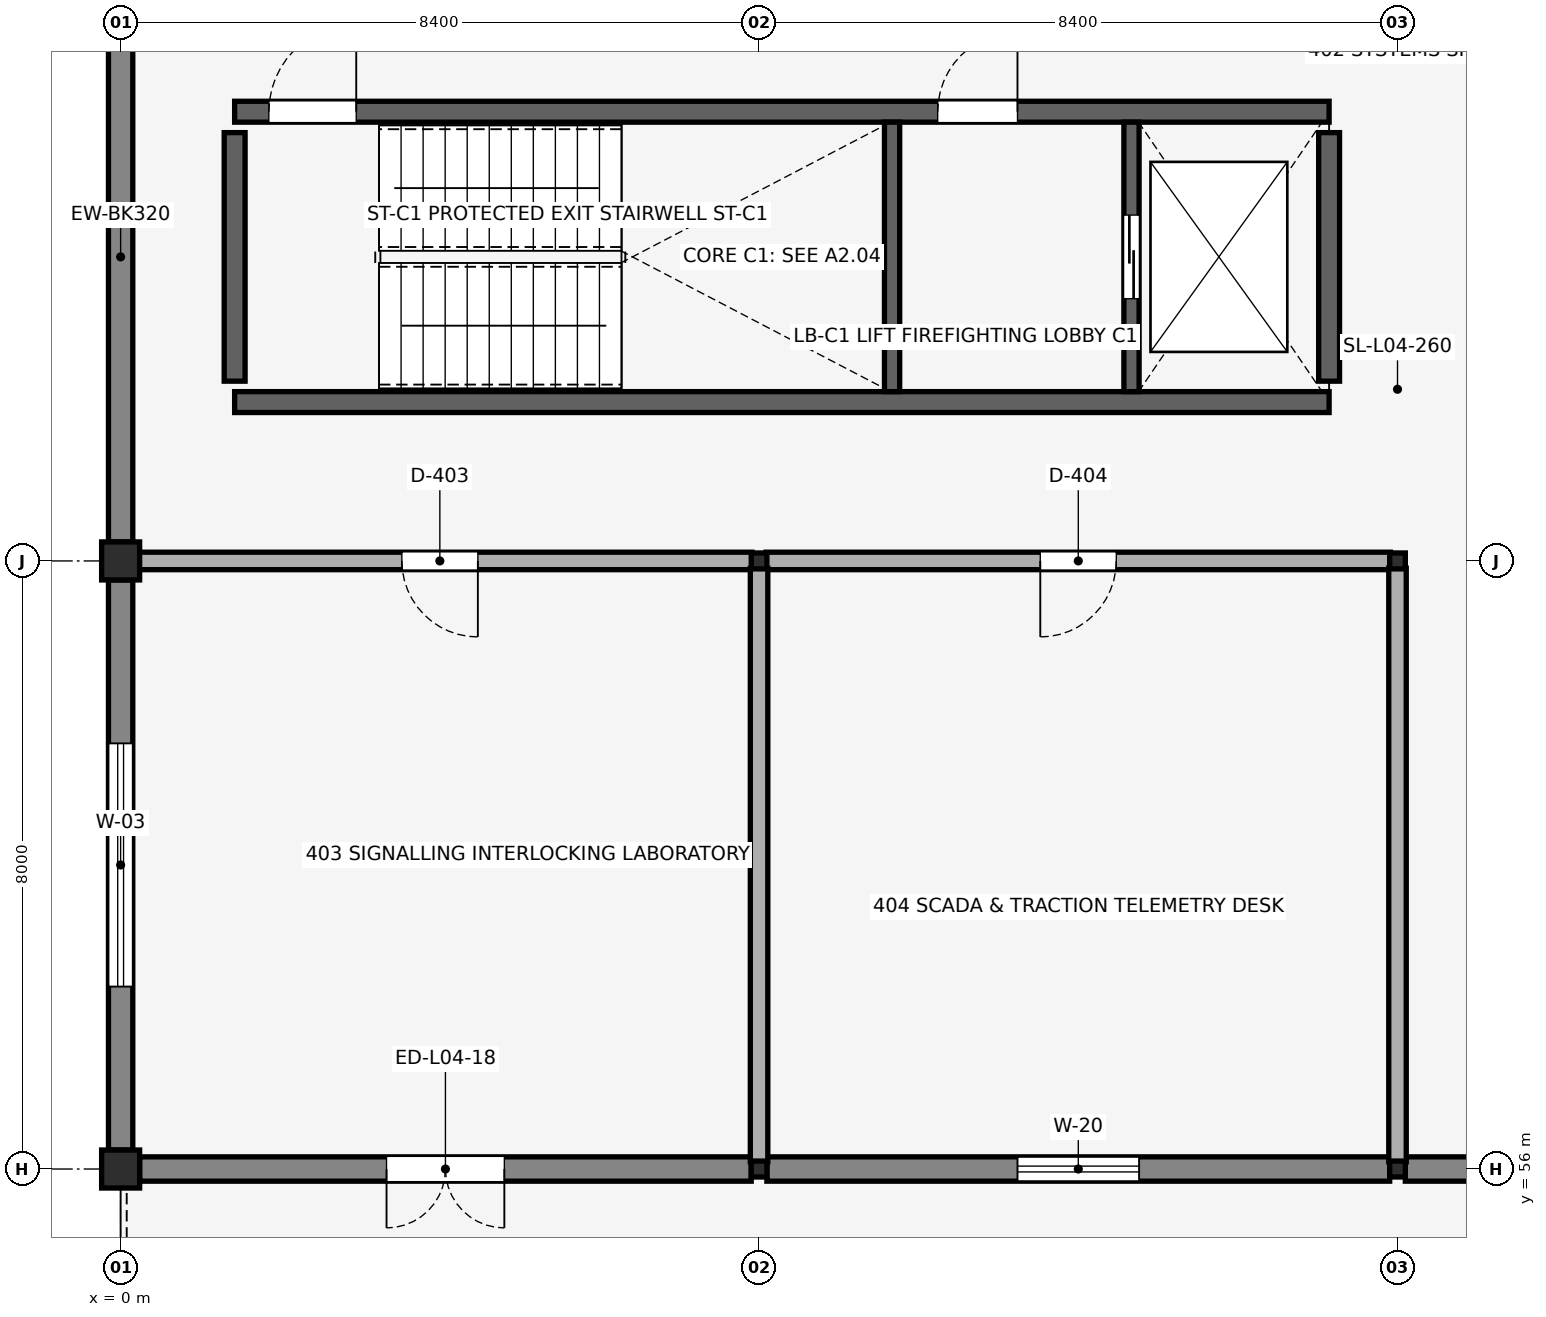
"""IFC4 building model, lengths in metres.
Left out: names, types, materials, properties, quantities, classifications, styles, units other than length and angle.
Written with IfcOpenShell. Run it as: python <this file> out.ifc"""

import sys

from ifc_helpers import new_model, si_unit, direction, frame, frame_2d, origin, origin_2d, place, context, subcontext, project, spatial, rectangle, i_section, extrude, element, fill, save


model = new_model("IFC4")
c1 = context("Model", 3, precision=1e-05, world=origin(), true_north=direction((0.0, 1.0)))
c2 = subcontext(c1, "Body", "Model", "MODEL_VIEW")
j1 = project(units=[si_unit("LENGTHUNIT", "METRE"), si_unit("PLANEANGLEUNIT", "RADIAN")], contexts=[c1])
p1 = place(None, origin())
s1 = spatial("IfcSite", under=j1, at=p1, CompositionType="ELEMENT")
p2 = place(p1, origin())
s2 = spatial("IfcBuilding", under=s1, at=p2, CompositionType="ELEMENT")
p3 = place(p2, frame((0.0, 0.0, 17.2)))
s3 = spatial("IfcBuildingStorey", under=s2, at=p3, CompositionType="ELEMENT", Elevation=17.2)
p4 = place(p3, frame((1.5, 66.09, 0.0), z_axis=(0.0, 0.0, 1.0), x_axis=(1.0, 0.0, 0.0)))
e1 = element("IfcWall", 1, at=p4, inside=s3, PredefinedType="SHEAR", context=c2, shape_type="SweptSolid", body=[
    extrude(rectangle(XDim=14.4, YDim=0.275, at=frame_2d((7.2, 0.0))), origin(), (0.0, 0.0, 1.0), 3.59),
])
p5 = place(p3, frame((1.5, 69.91, 0.0), z_axis=(0.0, 0.0, 1.0), x_axis=(1.0, 0.0, 0.0)))
e2 = element("IfcWall", 2, at=p5, inside=s3, PredefinedType="SHEAR", context=c2, shape_type="SweptSolid", body=[
    extrude(rectangle(XDim=14.4, YDim=0.275, at=frame_2d((7.2, 0.0))), origin(), (0.0, 0.0, 1.0), 3.59),
])
p6 = place(p5, frame((0.45, 0.0, 0.0), z_axis=(0.0, 0.0, 1.0), x_axis=(1.0, 0.0, 0.0)))
e3 = element("IfcOpeningElement", 3, at=p6, cuts=e2, PredefinedType="OPENING", context=c2, shape_type="SweptSolid", body=[
    extrude(rectangle(XDim=1.15, YDim=2.15, at=frame_2d((0.575, 1.075))), frame((0.0, 0.147, 0.0), z_axis=(0.0, -1.0, 0.0), x_axis=(1.0, 0.0, 0.0)), (0.0, 0.0, 1.0), 0.295),
])
p7 = place(p5, frame((9.25, 0.0, 0.0), z_axis=(0.0, 0.0, 1.0), x_axis=(1.0, 0.0, 0.0)))
e4 = element("IfcOpeningElement", 4, at=p7, cuts=e2, PredefinedType="OPENING", context=c2, shape_type="SweptSolid", body=[
    extrude(rectangle(XDim=1.05, YDim=2.15, at=frame_2d((0.525, 1.075))), frame((0.0, 0.147, 0.0), z_axis=(0.0, -1.0, 0.0), x_axis=(1.0, 0.0, 0.0)), (0.0, 0.0, 1.0), 0.295),
])
for number, where, z_axis, x_axis in (
    (5, (1.5, 66.365, 0.0), (0.0, 0.0, 1.0), (0.0, 1.0, 0.0)),
    (6, (15.9, 66.365, 0.0), (0.0, 0.0, 1.0), (0.0, 1.0, 0.0)),
):
    element("IfcWall", number, at=place(p3, frame(where, z_axis=z_axis, x_axis=x_axis)), inside=s3, PredefinedType="SHEAR", context=c2, shape_type="SweptSolid", body=[
        extrude(rectangle(XDim=3.27, YDim=0.275, at=frame_2d((1.635, 0.0))), origin(), (0.0, 0.0, 1.0), 3.59),
    ])
for number, where, z_axis, x_axis in (
    (7, (0.0, 56.0, 0.0), (0.0, 0.0, 1.0), (1.0, 0.0, 0.0)),
    (8, (0.0, 64.0, 0.0), (0.0, 0.0, 1.0), (1.0, 0.0, 0.0)),
):
    element("IfcColumn", number, at=place(p3, frame(where, z_axis=z_axis, x_axis=x_axis)), inside=s3, PredefinedType="COLUMN", context=c2, shape_type="SweptSolid", body=[
        extrude(rectangle(XDim=0.5, YDim=0.5, at=origin_2d()), origin(), (0.0, 0.0, 1.0), 3.59),
    ])
for number, where, z_axis, x_axis in (
    (9, (8.4, 56.0, 0.0), (0.0, 0.0, 1.0), (1.0, 0.0, 0.0)),
    (10, (8.4, 64.0, 0.0), (0.0, 0.0, 1.0), (1.0, 0.0, 0.0)),
    (11, (16.8, 56.0, 0.0), (0.0, 0.0, 1.0), (1.0, 0.0, 0.0)),
    (12, (16.8, 64.0, 0.0), (0.0, 0.0, 1.0), (1.0, 0.0, 0.0)),
):
    element("IfcColumn", number, at=place(p3, frame(where, z_axis=z_axis, x_axis=x_axis)), inside=s3, PredefinedType="COLUMN", context=c2, shape_type="SweptSolid", body=[
        extrude(i_section(OverallWidth=0.206, OverallDepth=0.21, WebThickness=0.01, FlangeThickness=0.014, FilletRadius=0.01, at=origin_2d()), origin(), (0.0, 0.0, 1.0), 3.59),
    ])
p8 = place(p3, frame((0.25, 56.0, 0.0), z_axis=(0.0, 0.0, 1.0), x_axis=(1.0, 0.0, 0.0)))
e13 = element("IfcWall", 13, at=p8, inside=s3, PredefinedType="SOLIDWALL", context=c2, shape_type="SweptSolid", body=[
    extrude(rectangle(XDim=8.047, YDim=0.32, at=frame_2d((4.023, 0.0))), origin(), (0.0, 0.0, 1.0), 3.33),
])
p9 = place(p8, frame((4.799, 0.0, 0.0), z_axis=(0.0, 0.0, 1.0), x_axis=(-1.0, 0.0, 0.0)))
e14 = element("IfcOpeningElement", 14, at=p9, cuts=e13, PredefinedType="OPENING", context=c2, shape_type="SweptSolid", body=[
    extrude(rectangle(XDim=1.55, YDim=2.2, at=frame_2d((0.775, 1.1))), frame((0.0, 0.17, 0.0), z_axis=(0.0, -1.0, 0.0), x_axis=(1.0, 0.0, 0.0)), (0.0, 0.0, 1.0), 0.34),
])
p10 = place(p3, frame((8.503, 56.0, 0.0), z_axis=(0.0, 0.0, 1.0), x_axis=(1.0, 0.0, 0.0)))
e15 = element("IfcWall", 15, at=p10, inside=s3, PredefinedType="SOLIDWALL", context=c2, shape_type="SweptSolid", body=[
    extrude(rectangle(XDim=8.194, YDim=0.32, at=frame_2d((4.097, 0.0))), origin(), (0.0, 0.0, 1.0), 3.33),
])
p11 = place(p10, frame((3.297, 0.0, 0.9), z_axis=(0.0, 0.0, 1.0), x_axis=(1.0, 0.0, 0.0)))
e16 = element("IfcOpeningElement", 16, at=p11, cuts=e15, PredefinedType="OPENING", context=c2, shape_type="SweptSolid", body=[
    extrude(rectangle(XDim=1.6, YDim=1.2, at=frame_2d((0.8, 0.6))), frame((0.0, 0.17, 0.0), z_axis=(0.0, -1.0, 0.0), x_axis=(1.0, 0.0, 0.0)), (0.0, 0.0, 1.0), 0.34),
])
p12 = place(p3, frame((16.903, 56.0, 0.0), z_axis=(0.0, 0.0, 1.0), x_axis=(1.0, 0.0, 0.0)))
e17 = element("IfcWall", 17, at=p12, inside=s3, PredefinedType="SOLIDWALL", context=c2, shape_type="SweptSolid", body=[
    extrude(rectangle(XDim=8.194, YDim=0.32, at=frame_2d((4.097, 0.0))), origin(), (0.0, 0.0, 1.0), 3.33),
])
p13 = place(p12, frame((2.297, 0.0, 0.9), z_axis=(0.0, 0.0, 1.0), x_axis=(1.0, 0.0, 0.0)))
e18 = element("IfcOpeningElement", 18, at=p13, cuts=e17, PredefinedType="OPENING", context=c2, shape_type="SweptSolid", body=[
    extrude(rectangle(XDim=3.6, YDim=1.8, at=frame_2d((1.8, 0.9))), frame((0.0, 0.17, 0.0), z_axis=(0.0, -1.0, 0.0), x_axis=(1.0, 0.0, 0.0)), (0.0, 0.0, 1.0), 0.34),
])
p14 = place(p3, frame((0.0, 56.25, 0.0), z_axis=(0.0, 0.0, 1.0), x_axis=(0.0, 1.0, 0.0)))
e19 = element("IfcWall", 19, at=p14, inside=s3, PredefinedType="SOLIDWALL", context=c2, shape_type="SweptSolid", body=[
    extrude(rectangle(XDim=7.5, YDim=0.32, at=frame_2d((3.75, 0.0))), origin(), (0.0, 0.0, 1.0), 3.29),
])
p15 = place(p14, frame((2.15, 0.0, 0.9), z_axis=(0.0, 0.0, 1.0), x_axis=(1.0, 0.0, 0.0)))
e20 = element("IfcOpeningElement", 20, at=p15, cuts=e19, PredefinedType="OPENING", context=c2, shape_type="SweptSolid", body=[
    extrude(rectangle(XDim=3.2, YDim=1.65, at=frame_2d((1.6, 0.825))), frame((0.0, 0.17, 0.0), z_axis=(0.0, -1.0, 0.0), x_axis=(1.0, 0.0, 0.0)), (0.0, 0.0, 1.0), 0.34),
])
p16 = place(p3, frame((0.0, 64.25, 0.0), z_axis=(0.0, 0.0, 1.0), x_axis=(0.0, 1.0, 0.0)))
e21 = element("IfcWall", 21, at=p16, inside=s3, PredefinedType="SOLIDWALL", context=c2, shape_type="SweptSolid", body=[
    extrude(rectangle(XDim=7.5, YDim=0.32, at=frame_2d((3.75, 0.0))), origin(), (0.0, 0.0, 1.0), 3.29),
])
p17 = place(p3, frame((10.15, 66.228, 0.0), z_axis=(0.0, 0.0, 1.0), x_axis=(0.0, 1.0, 0.0)))
e22 = element("IfcWall", 22, at=p17, inside=s3, PredefinedType="SHEAR", context=c2, shape_type="SweptSolid", body=[
    extrude(rectangle(XDim=3.545, YDim=0.2, at=frame_2d((1.772, 0.0))), origin(), (0.0, 0.0, 1.0), 3.59),
])
p18 = place(p3, frame((13.3, 66.228, 0.0), z_axis=(0.0, 0.0, 1.0), x_axis=(0.0, 1.0, 0.0)))
e23 = element("IfcWall", 23, at=p18, inside=s3, PredefinedType="SHEAR", context=c2, shape_type="SweptSolid", body=[
    extrude(rectangle(XDim=3.545, YDim=0.2, at=frame_2d((1.772, 0.0))), origin(), (0.0, 0.0, 1.0), 3.59),
])
p19 = place(p18, frame((1.222, 0.0, 0.0), z_axis=(0.0, 0.0, 1.0), x_axis=(1.0, 0.0, 0.0)))
e24 = element("IfcOpeningElement", 24, at=p19, cuts=e23, PredefinedType="OPENING", context=c2, shape_type="SweptSolid", body=[
    extrude(rectangle(XDim=1.1, YDim=2.15, at=frame_2d((0.55, 1.075))), frame((0.0, 0.11, 0.0), z_axis=(0.0, -1.0, 0.0), x_axis=(1.0, 0.0, 0.0)), (0.0, 0.0, 1.0), 0.22),
])
p20 = place(p3, frame((0.24, 64.0, 0.0), z_axis=(0.0, 0.0, 1.0), x_axis=(1.0, 0.0, 0.0)))
e25 = element("IfcWall", 25, at=p20, inside=s3, PredefinedType="PARTITIONING", context=c2, shape_type="SweptSolid", body=[
    extrude(rectangle(XDim=8.067, YDim=0.23, at=frame_2d((4.034, 0.0))), origin(), (0.0, 0.0, 1.0), 3.137),
])
p21 = place(p20, frame((4.46, 0.0, 0.0), z_axis=(0.0, 0.0, 1.0), x_axis=(-1.0, 0.0, 0.0)))
e26 = element("IfcOpeningElement", 26, at=p21, cuts=e25, PredefinedType="OPENING", context=c2, shape_type="SweptSolid", body=[
    extrude(rectangle(XDim=1.0, YDim=2.15, at=frame_2d((0.5, 1.075))), frame((0.0, 0.125, 0.0), z_axis=(0.0, -1.0, 0.0), x_axis=(1.0, 0.0, 0.0)), (0.0, 0.0, 1.0), 0.25),
])
p22 = place(p3, frame((8.493, 64.0, 0.0), z_axis=(0.0, 0.0, 1.0), x_axis=(1.0, 0.0, 0.0)))
e27 = element("IfcWall", 27, at=p22, inside=s3, PredefinedType="PARTITIONING", context=c2, shape_type="SweptSolid", body=[
    extrude(rectangle(XDim=8.214, YDim=0.23, at=frame_2d((4.107, 0.0))), origin(), (0.0, 0.0, 1.0), 3.137),
])
p23 = place(p22, frame((4.607, 0.0, 0.0), z_axis=(0.0, 0.0, 1.0), x_axis=(-1.0, 0.0, 0.0)))
e28 = element("IfcOpeningElement", 28, at=p23, cuts=e27, PredefinedType="OPENING", context=c2, shape_type="SweptSolid", body=[
    extrude(rectangle(XDim=1.0, YDim=2.15, at=frame_2d((0.5, 1.075))), frame((0.0, 0.125, 0.0), z_axis=(0.0, -1.0, 0.0), x_axis=(1.0, 0.0, 0.0)), (0.0, 0.0, 1.0), 0.25),
])
for number, where, z_axis, x_axis in (
    (29, (8.4, 56.095, 0.0), (0.0, 0.0, 1.0), (0.0, 1.0, 0.0)),
    (30, (16.8, 56.095, 0.0), (0.0, 0.0, 1.0), (0.0, 1.0, 0.0)),
):
    element("IfcWall", number, at=place(p3, frame(where, z_axis=z_axis, x_axis=x_axis)), inside=s3, PredefinedType="PARTITIONING", context=c2, shape_type="SweptSolid", body=[
        extrude(rectangle(XDim=7.811, YDim=0.23, at=frame_2d((3.905, 0.0))), origin(), (0.0, 0.0, 1.0), 3.137),
    ])
p24 = place(p9, origin())
e31 = element("IfcDoor", 31, at=p24, inside=s3, OperationType="DOUBLE_DOOR_SINGLE_SWING", PredefinedType="DOOR", context=c2, shape_type="SweptSolid", body=[
    extrude(rectangle(XDim=1.55, YDim=2.2, at=frame_2d((0.775, 1.1))), frame((0.0, 0.025, 0.0), z_axis=(0.0, -1.0, 0.0), x_axis=(1.0, 0.0, 0.0)), (0.0, 0.0, 1.0), 0.05),
])
fill(e14, e31)
p25 = place(p11, origin())
e32 = element("IfcWindow", 32, at=p25, inside=s3, PartitioningType="DOUBLE_PANEL_VERTICAL", PredefinedType="WINDOW", context=c2, shape_type="SweptSolid", body=[
    extrude(rectangle(XDim=1.6, YDim=1.2, at=frame_2d((0.8, 0.6))), frame((0.0, 0.03, 0.0), z_axis=(0.0, -1.0, 0.0), x_axis=(1.0, 0.0, 0.0)), (0.0, 0.0, 1.0), 0.06),
])
fill(e16, e32)
p26 = place(p15, origin())
e33 = element("IfcWindow", 33, at=p26, inside=s3, PartitioningType="TRIPLE_PANEL_VERTICAL", PredefinedType="WINDOW", context=c2, shape_type="SweptSolid", body=[
    extrude(rectangle(XDim=3.2, YDim=1.65, at=frame_2d((1.6, 0.825))), frame((0.0, 0.03, 0.0), z_axis=(0.0, -1.0, 0.0), x_axis=(1.0, 0.0, 0.0)), (0.0, 0.0, 1.0), 0.06),
])
fill(e20, e33)
p27 = place(p6, origin())
e34 = element("IfcDoor", 34, at=p27, inside=s3, OperationType="SINGLE_SWING_RIGHT", PredefinedType="DOOR", context=c2, shape_type="SweptSolid", body=[
    extrude(rectangle(XDim=1.15, YDim=2.15, at=frame_2d((0.575, 1.075))), frame((0.0, 0.025, 0.0), z_axis=(0.0, -1.0, 0.0), x_axis=(1.0, 0.0, 0.0)), (0.0, 0.0, 1.0), 0.05),
])
fill(e3, e34)
p28 = place(p7, origin())
e35 = element("IfcDoor", 35, at=p28, inside=s3, OperationType="SINGLE_SWING_RIGHT", PredefinedType="DOOR", context=c2, shape_type="SweptSolid", body=[
    extrude(rectangle(XDim=1.05, YDim=2.15, at=frame_2d((0.525, 1.075))), frame((0.0, 0.025, 0.0), z_axis=(0.0, -1.0, 0.0), x_axis=(1.0, 0.0, 0.0)), (0.0, 0.0, 1.0), 0.05),
])
fill(e4, e35)
p29 = place(p19, origin())
e36 = element("IfcDoor", 36, at=p29, inside=s3, OperationType="DOUBLE_DOOR_SLIDING", PredefinedType="DOOR", context=c2, shape_type="SweptSolid", body=[
    extrude(rectangle(XDim=1.1, YDim=2.15, at=frame_2d((0.55, 1.075))), frame((0.0, 0.025, 0.0), z_axis=(0.0, -1.0, 0.0), x_axis=(1.0, 0.0, 0.0)), (0.0, 0.0, 1.0), 0.05),
])
fill(e24, e36)
p30 = place(p21, origin())
e37 = element("IfcDoor", 37, at=p30, inside=s3, OperationType="SINGLE_SWING_LEFT", PredefinedType="DOOR", context=c2, shape_type="SweptSolid", body=[
    extrude(rectangle(XDim=1.0, YDim=2.15, at=frame_2d((0.5, 1.075))), frame((0.0, 0.025, 0.0), z_axis=(0.0, -1.0, 0.0), x_axis=(1.0, 0.0, 0.0)), (0.0, 0.0, 1.0), 0.05),
])
fill(e26, e37)
p31 = place(p23, origin())
e38 = element("IfcDoor", 38, at=p31, inside=s3, OperationType="SINGLE_SWING_RIGHT", PredefinedType="DOOR", context=c2, shape_type="SweptSolid", body=[
    extrude(rectangle(XDim=1.0, YDim=2.15, at=frame_2d((0.5, 1.075))), frame((0.0, 0.025, 0.0), z_axis=(0.0, -1.0, 0.0), x_axis=(1.0, 0.0, 0.0)), (0.0, 0.0, 1.0), 0.05),
])
fill(e28, e38)
save(model, sys.argv[1])
